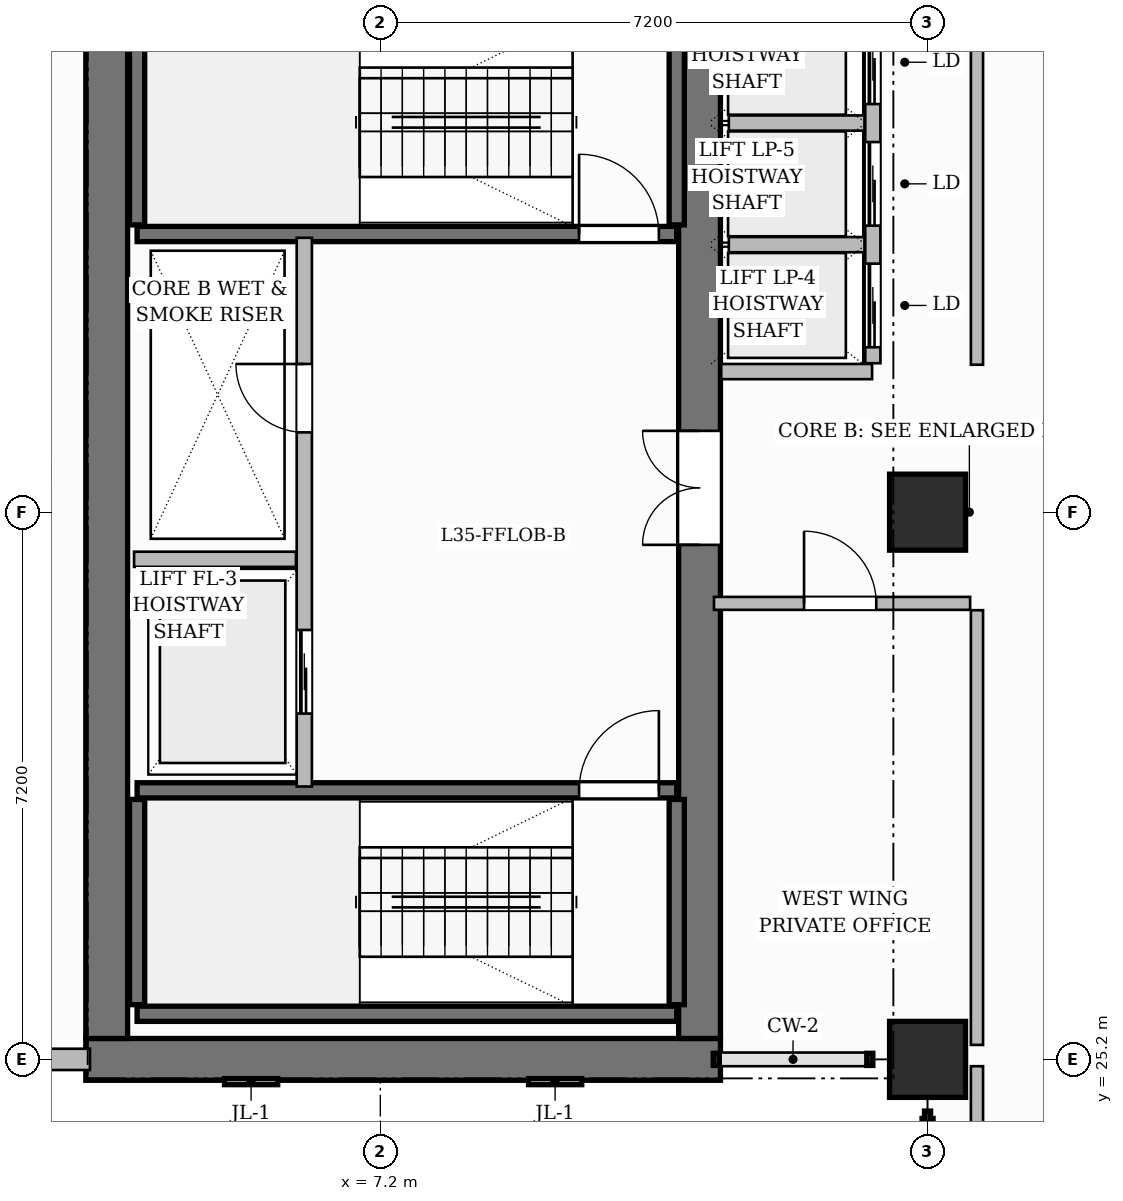
"""IFC4 building model, lengths in metres.
Left out: names, types, materials, properties, quantities, classifications, styles, units other than length and angle.
Written with IfcOpenShell. Run it as: python <this file> out.ifc"""

import sys

from ifc_helpers import new_model, si_unit, direction, frame, frame_2d, origin, origin_2d, place, context, subcontext, project, spatial, rectangle, extrude, source, transform, mapped, element, fill, save


model = new_model("IFC4")
c1 = context("Model", 3, precision=1e-05, world=origin(), true_north=direction((0.0, 1.0)))
c2 = subcontext(c1, "Body", "Model", "MODEL_VIEW")
j1 = project(units=[si_unit("LENGTHUNIT", "METRE"), si_unit("PLANEANGLEUNIT", "RADIAN")], contexts=[c1])
p1 = place(None, origin())
s1 = spatial("IfcSite", under=j1, at=p1, CompositionType="ELEMENT")
p2 = place(p1, origin())
s2 = spatial("IfcBuilding", under=s1, at=p2, CompositionType="ELEMENT")
p3 = place(p2, frame((0.0, 0.0, 141.4)))
s3 = spatial("IfcBuildingStorey", under=s2, at=p3, CompositionType="ELEMENT", Elevation=141.4)
p4 = place(p3, frame((3.325, 25.2, 0.0), z_axis=(0.0, 0.0, 1.0), x_axis=(1.0, 0.0, 0.0)))
e1 = element("IfcWall", 1, at=p4, inside=s3, PredefinedType="SHEAR", context=c2, shape_type="SweptSolid", body=[
    extrude(rectangle(XDim=8.35, YDim=0.55, at=frame_2d((4.175, 0.0))), origin(), (0.0, 0.0, 1.0), 3.7),
])
p5 = place(p3, frame((3.6, 25.475, 0.0), z_axis=(0.0, 0.0, 1.0), x_axis=(0.0, 1.0, 0.0)))
e2 = element("IfcWall", 2, at=p5, inside=s3, PredefinedType="SHEAR", context=c2, shape_type="SweptSolid", body=[
    extrude(rectangle(XDim=13.85, YDim=0.55, at=frame_2d((6.925, 0.0))), origin(), (0.0, 0.0, 1.0), 3.7),
])
p6 = place(p3, frame((11.4, 25.475, 0.0), z_axis=(0.0, 0.0, 1.0), x_axis=(0.0, 1.0, 0.0)))
e3 = element("IfcWall", 3, at=p6, inside=s3, PredefinedType="SHEAR", context=c2, shape_type="SweptSolid", body=[
    extrude(rectangle(XDim=13.85, YDim=0.55, at=frame_2d((6.925, 0.0))), origin(), (0.0, 0.0, 1.0), 3.7),
])
p7 = place(p6, frame((6.495, 0.0, 0.0)))
e4 = element("IfcOpeningElement", 4, at=p7, cuts=e3, PredefinedType="OPENING", context=c2, shape_type="SweptSolid", body=[
    extrude(rectangle(XDim=1.5, YDim=2.2, at=frame_2d((0.75, 1.1))), frame((0.0, 0.285, 0.0), z_axis=(0.0, -1.0, 0.0), x_axis=(1.0, 0.0, 0.0)), (0.0, 0.0, 1.0), 0.57),
])
m1 = source(origin(), c2, "Body", "SweptSolid", [
    extrude(rectangle(XDim=1.0, YDim=1.0, at=origin_2d()), origin(), (0.0, 0.0, 1.0), 3.7),
])
for number, where, z_axis, x_axis in (
    (5, (14.4, 25.2, 0.0), (0.0, 0.0, 1.0), (1.0, 0.0, 0.0)),
    (6, (14.4, 32.4, 0.0), (0.0, 0.0, 1.0), (1.0, 0.0, 0.0)),
):
    element("IfcColumn", number, at=place(p3, frame(where, z_axis=z_axis, x_axis=x_axis)), inside=s3, PredefinedType="COLUMN", context=c2, shape_type="MappedRepresentation", body=[
        mapped(m1, transform((0.0, 0.0, 0.0), scale=1.0)),
    ])
p8 = place(p3, frame((4.0, 25.8, 0.0), z_axis=(0.0, 0.0, 1.0), x_axis=(1.0, 0.0, 0.0)))
e7 = element("IfcWall", 7, at=p8, inside=s3, PredefinedType="SHEAR", context=c2, shape_type="SweptSolid", body=[
    extrude(rectangle(XDim=7.1, YDim=0.2, at=frame_2d((3.55, 0.0))), origin(), (0.0, 0.0, 1.0), 3.7),
])
for number, where, z_axis, x_axis in (
    (8, (4.0, 25.92, 0.0), (0.0, 0.0, 1.0), (0.0, 1.0, 0.0)),
    (9, (11.1, 25.92, 0.0), (0.0, 0.0, 1.0), (0.0, 1.0, 0.0)),
):
    element("IfcWall", number, at=place(p3, frame(where, z_axis=z_axis, x_axis=x_axis)), inside=s3, PredefinedType="SHEAR", context=c2, shape_type="SweptSolid", body=[
        extrude(rectangle(XDim=2.7, YDim=0.2, at=frame_2d((1.35, 0.0))), origin(), (0.0, 0.0, 1.0), 3.7),
    ])
p9 = place(p3, frame((4.0, 28.74, 0.0), z_axis=(0.0, 0.0, 1.0), x_axis=(1.0, 0.0, 0.0)))
e10 = element("IfcWall", 10, at=p9, inside=s3, PredefinedType="SHEAR", context=c2, shape_type="SweptSolid", body=[
    extrude(rectangle(XDim=7.1, YDim=0.2, at=frame_2d((3.55, 0.0))), origin(), (0.0, 0.0, 1.0), 3.7),
])
p10 = place(p9, frame((5.815, 0.0, 0.0)))
e11 = element("IfcOpeningElement", 11, at=p10, cuts=e10, PredefinedType="OPENING", context=c2, shape_type="SweptSolid", body=[
    extrude(rectangle(XDim=1.05, YDim=2.2, at=frame_2d((0.525, 1.1))), frame((0.0, 0.11, 0.0), z_axis=(0.0, -1.0, 0.0), x_axis=(1.0, 0.0, 0.0)), (0.0, 0.0, 1.0), 0.22),
])
for number, where, z_axis, x_axis in (
    (12, (4.0, 36.18, 0.0), (0.0, 0.0, 1.0), (0.0, 1.0, 0.0)),
    (13, (11.1, 36.18, 0.0), (0.0, 0.0, 1.0), (0.0, 1.0, 0.0)),
):
    element("IfcWall", number, at=place(p3, frame(where, z_axis=z_axis, x_axis=x_axis)), inside=s3, PredefinedType="SHEAR", context=c2, shape_type="SweptSolid", body=[
        extrude(rectangle(XDim=2.7, YDim=0.2, at=frame_2d((1.35, 0.0))), origin(), (0.0, 0.0, 1.0), 3.7),
    ])
p11 = place(p3, frame((4.0, 36.06, 0.0), z_axis=(0.0, 0.0, 1.0), x_axis=(1.0, 0.0, 0.0)))
e14 = element("IfcWall", 14, at=p11, inside=s3, PredefinedType="SHEAR", context=c2, shape_type="SweptSolid", body=[
    extrude(rectangle(XDim=7.1, YDim=0.2, at=frame_2d((3.55, 0.0))), origin(), (0.0, 0.0, 1.0), 3.7),
])
p12 = place(p11, frame((5.815, 0.0, 0.0)))
e15 = element("IfcOpeningElement", 15, at=p12, cuts=e14, PredefinedType="OPENING", context=c2, shape_type="SweptSolid", body=[
    extrude(rectangle(XDim=1.05, YDim=2.2, at=frame_2d((0.525, 1.1))), frame((0.0, 0.11, 0.0), z_axis=(0.0, -1.0, 0.0), x_axis=(1.0, 0.0, 0.0)), (0.0, 0.0, 1.0), 0.22),
])
p13 = place(p3, frame((6.2, 28.79, 0.0), z_axis=(0.0, 0.0, 1.0), x_axis=(0.0, 1.0, 0.0)))
e16 = element("IfcWall", 16, at=p13, inside=s3, PredefinedType="PARTITIONING", context=c2, shape_type="SweptSolid", body=[
    extrude(rectangle(XDim=7.22, YDim=0.2, at=frame_2d((3.61, 0.0))), origin(), (0.0, 0.0, 1.0), 3.4),
])
p14 = place(p13, frame((4.66, 0.0, 0.0)))
e17 = element("IfcOpeningElement", 17, at=p14, cuts=e16, PredefinedType="OPENING", context=c2, shape_type="SweptSolid", body=[
    extrude(rectangle(XDim=0.9, YDim=2.1, at=frame_2d((0.45, 1.05))), frame((0.0, 0.11, 0.0), z_axis=(0.0, -1.0, 0.0), x_axis=(1.0, 0.0, 0.0)), (0.0, 0.0, 1.0), 0.22),
])
p15 = place(p13, frame((0.96, 0.0, 0.0)))
e18 = element("IfcOpeningElement", 18, at=p15, cuts=e16, PredefinedType="OPENING", context=c2, shape_type="SweptSolid", body=[
    extrude(rectangle(XDim=1.1, YDim=2.2, at=frame_2d((0.55, 1.1))), frame((0.0, 0.11, 0.0), z_axis=(0.0, -1.0, 0.0), x_axis=(1.0, 0.0, 0.0)), (0.0, 0.0, 1.0), 0.22),
])
p16 = place(p3, frame((3.96, 31.78, 0.0), z_axis=(0.0, 0.0, 1.0), x_axis=(1.0, 0.0, 0.0)))
e19 = element("IfcWall", 19, at=p16, inside=s3, PredefinedType="PARTITIONING", context=c2, shape_type="SweptSolid", body=[
    extrude(rectangle(XDim=2.13, YDim=0.2, at=frame_2d((1.065, 0.0))), origin(), (0.0, 0.0, 1.0), 3.4),
])
p17 = place(p3, frame((11.685, 34.25, 0.0), z_axis=(0.0, 0.0, 1.0), x_axis=(1.0, 0.0, 0.0)))
e20 = element("IfcWall", 20, at=p17, inside=s3, PredefinedType="PARTITIONING", context=c2, shape_type="SweptSolid", body=[
    extrude(rectangle(XDim=1.985, YDim=0.2, at=frame_2d((0.992, 0.0))), origin(), (0.0, 0.0, 1.0), 3.4),
])
p18 = place(p3, frame((13.68, 34.36, 0.0), z_axis=(0.0, 0.0, 1.0), x_axis=(0.0, 1.0, 0.0)))
e21 = element("IfcWall", 21, at=p18, inside=s3, PredefinedType="PARTITIONING", context=c2, shape_type="SweptSolid", body=[
    extrude(rectangle(XDim=4.72, YDim=0.2, at=frame_2d((2.36, 0.0))), origin(), (0.0, 0.0, 1.0), 3.4),
])
p19 = place(p18, frame((0.21, 0.0, 0.0)))
e22 = element("IfcOpeningElement", 22, at=p19, cuts=e21, PredefinedType="OPENING", context=c2, shape_type="SweptSolid", body=[
    extrude(rectangle(XDim=1.1, YDim=2.2, at=frame_2d((0.55, 1.1))), frame((0.0, 0.11, 0.0), z_axis=(0.0, -1.0, 0.0), x_axis=(1.0, 0.0, 0.0)), (0.0, 0.0, 1.0), 0.22),
])
p20 = place(p18, frame((1.81, 0.0, 0.0)))
e23 = element("IfcOpeningElement", 23, at=p20, cuts=e21, PredefinedType="OPENING", context=c2, shape_type="SweptSolid", body=[
    extrude(rectangle(XDim=1.1, YDim=2.2, at=frame_2d((0.55, 1.1))), frame((0.0, 0.11, 0.0), z_axis=(0.0, -1.0, 0.0), x_axis=(1.0, 0.0, 0.0)), (0.0, 0.0, 1.0), 0.22),
])
p21 = place(p18, frame((3.41, 0.0, 0.0)))
e24 = element("IfcOpeningElement", 24, at=p21, cuts=e21, PredefinedType="OPENING", context=c2, shape_type="SweptSolid", body=[
    extrude(rectangle(XDim=1.1, YDim=2.2, at=frame_2d((0.55, 1.1))), frame((0.0, 0.11, 0.0), z_axis=(0.0, -1.0, 0.0), x_axis=(1.0, 0.0, 0.0)), (0.0, 0.0, 1.0), 0.22),
])
for number, where, z_axis, x_axis in (
    (25, (11.785, 35.92, 0.0), (0.0, 0.0, 1.0), (1.0, 0.0, 0.0)),
    (26, (11.785, 37.52, 0.0), (0.0, 0.0, 1.0), (1.0, 0.0, 0.0)),
):
    element("IfcWall", number, at=place(p3, frame(where, z_axis=z_axis, x_axis=x_axis)), inside=s3, PredefinedType="PARTITIONING", context=c2, shape_type="SweptSolid", body=[
        extrude(rectangle(XDim=1.785, YDim=0.2, at=frame_2d((0.893, 0.0))), origin(), (0.0, 0.0, 1.0), 3.4),
    ])
p22 = place(p3, frame((15.05, 12.16, 0.0), z_axis=(0.0, 0.0, 1.0), x_axis=(0.0, 1.0, 0.0)))
e27 = element("IfcWall", 27, at=p22, inside=s3, PredefinedType="PARTITIONING", context=c2, shape_type="SweptSolid", body=[
    extrude(rectangle(XDim=12.95, YDim=0.16, at=frame_2d((6.475, 0.0))), origin(), (0.0, 0.0, 1.0), 3.4),
])
p23 = place(p3, frame((15.05, 34.34, 0.0), z_axis=(0.0, 0.0, 1.0), x_axis=(0.0, 1.0, 0.0)))
e28 = element("IfcWall", 28, at=p23, inside=s3, PredefinedType="PARTITIONING", context=c2, shape_type="SweptSolid", body=[
    extrude(rectangle(XDim=5.22, YDim=0.16, at=frame_2d((2.61, 0.0))), origin(), (0.0, 0.0, 1.0), 3.4),
])
p24 = place(p3, frame((15.05, 25.39, 0.0), z_axis=(0.0, 0.0, 1.0), x_axis=(0.0, 1.0, 0.0)))
e29 = element("IfcWall", 29, at=p24, inside=s3, PredefinedType="PARTITIONING", context=c2, shape_type="SweptSolid", body=[
    extrude(rectangle(XDim=5.72, YDim=0.16, at=frame_2d((2.86, 0.0))), origin(), (0.0, 0.0, 1.0), 3.4),
])
p25 = place(p3, frame((11.59, 31.2, 0.0), z_axis=(0.0, 0.0, 1.0), x_axis=(1.0, 0.0, 0.0)))
e30 = element("IfcWall", 30, at=p25, inside=s3, PredefinedType="PARTITIONING", context=c2, shape_type="SweptSolid", body=[
    extrude(rectangle(XDim=3.37, YDim=0.17, at=frame_2d((1.685, 0.0))), origin(), (0.0, 0.0, 1.0), 3.4),
])
p26 = place(p25, frame((1.185, 0.0, 0.0)))
e31 = element("IfcOpeningElement", 31, at=p26, cuts=e30, PredefinedType="OPENING", context=c2, shape_type="SweptSolid", body=[
    extrude(rectangle(XDim=0.95, YDim=2.15, at=frame_2d((0.475, 1.075))), frame((0.0, 0.095, 0.0), z_axis=(0.0, -1.0, 0.0), x_axis=(1.0, 0.0, 0.0)), (0.0, 0.0, 1.0), 0.19),
])
p27 = place(p3, frame((0.0, 25.2, 0.0), z_axis=(0.0, 0.0, 1.0), x_axis=(1.0, 0.0, 0.0)))
e32 = element("IfcWall", 32, at=p27, inside=s3, PredefinedType="SOLIDWALL", context=c2, shape_type="SweptSolid", body=[
    extrude(rectangle(XDim=3.38, YDim=0.28, at=frame_2d((1.69, 0.0))), origin(), (0.0, 0.0, 1.0), 3.4),
])
p28 = place(p27, frame((1.205, 0.0, 0.8)))
e33 = element("IfcOpeningElement", 33, at=p28, cuts=e32, PredefinedType="OPENING", context=c2, shape_type="SweptSolid", body=[
    extrude(rectangle(XDim=1.4, YDim=1.85, at=frame_2d((0.7, 0.925))), frame((0.0, 0.15, 0.0), z_axis=(0.0, -1.0, 0.0), x_axis=(1.0, 0.0, 0.0)), (0.0, 0.0, 1.0), 0.3),
])
m2 = source(origin(), c2, "Body", "SweptSolid", [
    extrude(rectangle(XDim=1.05, YDim=2.2, at=frame_2d((0.525, 1.1))), frame((0.0, 0.025, 0.0), z_axis=(0.0, -1.0, 0.0), x_axis=(1.0, 0.0, 0.0)), (0.0, 0.0, 1.0), 0.05),
])
p29 = place(p10, origin())
e34 = element("IfcDoor", 34, at=p29, inside=s3, OperationType="SINGLE_SWING_RIGHT", PredefinedType="DOOR", context=c2, shape_type="MappedRepresentation", body=[
    mapped(m2, transform((0.0, 0.0, 0.0), scale=1.0)),
])
fill(e11, e34)
p30 = place(p12, origin())
e35 = element("IfcDoor", 35, at=p30, inside=s3, OperationType="SINGLE_SWING_LEFT", PredefinedType="DOOR", context=c2, shape_type="MappedRepresentation", body=[
    mapped(m2, transform((0.0, 0.0, 0.0), scale=1.0)),
])
fill(e15, e35)
m3 = source(origin(), c2, "Body", "SweptSolid", [
    extrude(rectangle(XDim=0.9, YDim=2.1, at=frame_2d((0.45, 1.05))), frame((0.0, 0.025, 0.0), z_axis=(0.0, -1.0, 0.0), x_axis=(1.0, 0.0, 0.0)), (0.0, 0.0, 1.0), 0.05),
])
p31 = place(p14, origin())
e36 = element("IfcDoor", 36, at=p31, inside=s3, OperationType="SINGLE_SWING_RIGHT", PredefinedType="DOOR", context=c2, shape_type="MappedRepresentation", body=[
    mapped(m3, transform((0.0, 0.0, 0.0), scale=1.0)),
])
fill(e17, e36)
m4 = source(origin(), c2, "Body", "SweptSolid", [
    extrude(rectangle(XDim=1.5, YDim=2.2, at=frame_2d((0.75, 1.1))), frame((0.0, 0.025, 0.0), z_axis=(0.0, -1.0, 0.0), x_axis=(1.0, 0.0, 0.0)), (0.0, 0.0, 1.0), 0.05),
])
p32 = place(p7, origin())
e37 = element("IfcDoor", 37, at=p32, inside=s3, OperationType="DOUBLE_DOOR_SINGLE_SWING", PredefinedType="DOOR", context=c2, shape_type="MappedRepresentation", body=[
    mapped(m4, transform((0.0, 0.0, 0.0), scale=1.0)),
])
fill(e4, e37)
m5 = source(origin(), c2, "Body", "SweptSolid", [
    extrude(rectangle(XDim=0.95, YDim=2.15, at=frame_2d((0.475, 1.075))), frame((0.0, 0.025, 0.0), z_axis=(0.0, -1.0, 0.0), x_axis=(1.0, 0.0, 0.0)), (0.0, 0.0, 1.0), 0.05),
])
p33 = place(p26, origin())
e38 = element("IfcDoor", 38, at=p33, inside=s3, OperationType="SINGLE_SWING_LEFT", PredefinedType="DOOR", context=c2, shape_type="MappedRepresentation", body=[
    mapped(m5, transform((0.0, 0.0, 0.0), scale=1.0)),
])
fill(e31, e38)
m6 = source(origin(), c2, "Body", "SweptSolid", [
    extrude(rectangle(XDim=1.1, YDim=2.2, at=frame_2d((0.55, 1.1))), frame((0.0, 0.025, 0.0), z_axis=(0.0, -1.0, 0.0), x_axis=(1.0, 0.0, 0.0)), (0.0, 0.0, 1.0), 0.05),
])
p34 = place(p15, origin())
e39 = element("IfcDoor", 39, at=p34, inside=s3, OperationType="SLIDING_TO_LEFT", PredefinedType="DOOR", context=c2, shape_type="MappedRepresentation", body=[
    mapped(m6, transform((0.0, 0.0, 0.0), scale=1.0)),
])
fill(e18, e39)
p35 = place(p19, origin())
e40 = element("IfcDoor", 40, at=p35, inside=s3, OperationType="SLIDING_TO_LEFT", PredefinedType="DOOR", context=c2, shape_type="MappedRepresentation", body=[
    mapped(m6, transform((0.0, 0.0, 0.0), scale=1.0)),
])
fill(e22, e40)
p36 = place(p20, origin())
e41 = element("IfcDoor", 41, at=p36, inside=s3, OperationType="SLIDING_TO_LEFT", PredefinedType="DOOR", context=c2, shape_type="MappedRepresentation", body=[
    mapped(m6, transform((0.0, 0.0, 0.0), scale=1.0)),
])
fill(e23, e41)
p37 = place(p21, origin())
e42 = element("IfcDoor", 42, at=p37, inside=s3, OperationType="SLIDING_TO_LEFT", PredefinedType="DOOR", context=c2, shape_type="MappedRepresentation", body=[
    mapped(m6, transform((0.0, 0.0, 0.0), scale=1.0)),
])
fill(e24, e42)
save(model, sys.argv[1])
